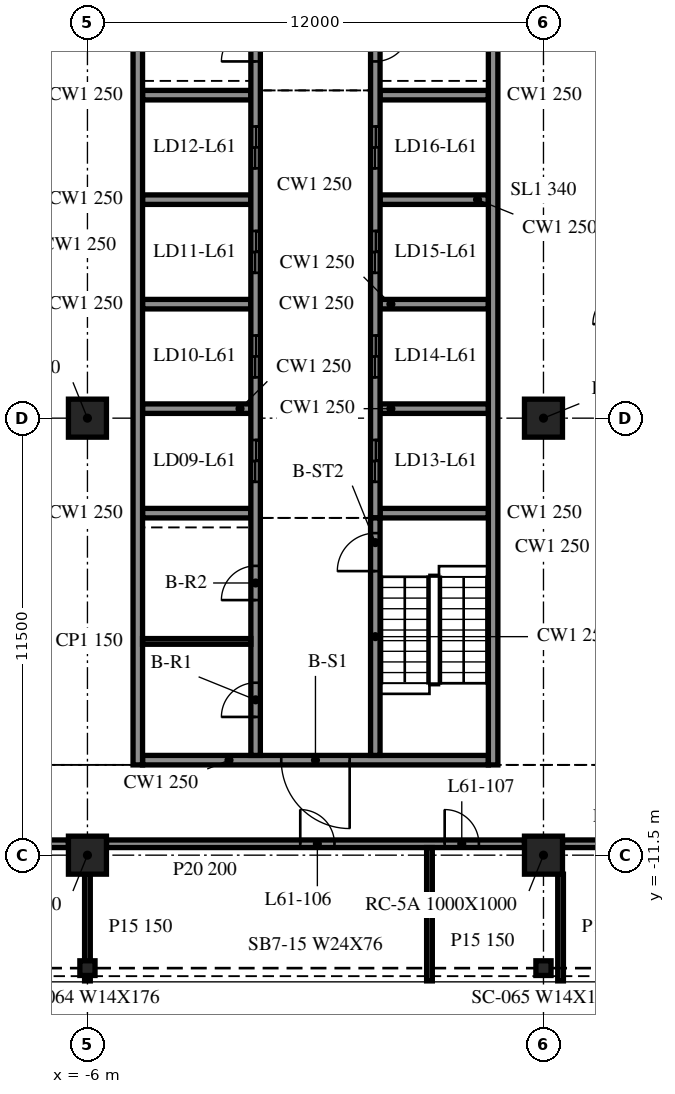
"""IFC4 building model, lengths in metres.
Left out: names, types, materials, properties, quantities, classifications, styles, units other than length and angle.
Written with IfcOpenShell. Run it as: python <this file> out.ifc"""

import sys

from ifc_helpers import new_model, si_unit, direction, frame, frame_2d, origin, origin_2d, place, context, subcontext, project, spatial, rectangle, i_section, extrude, element, fill, save


model = new_model("IFC4")
c1 = context("Model", 3, precision=1e-05, world=origin(), true_north=direction((0.0, 1.0)))
c2 = subcontext(c1, "Body", "Model", "MODEL_VIEW")
j1 = project(units=[si_unit("LENGTHUNIT", "METRE"), si_unit("PLANEANGLEUNIT", "RADIAN")], contexts=[c1])
p1 = place(None, origin())
s1 = spatial("IfcSite", under=j1, at=p1, CompositionType="ELEMENT")
p2 = place(p1, origin())
s2 = spatial("IfcBuilding", under=s1, at=p2, CompositionType="ELEMENT")
p3 = place(p2, frame((0.0, 0.0, 251.4)))
s3 = spatial("IfcBuildingStorey", under=s2, at=p3, CompositionType="ELEMENT", Elevation=251.4)
for number, where, z_axis, x_axis in (
    (1, (-6.0, -11.5, -0.34), (0.0, 0.0, 1.0), (1.0, 0.0, 0.0)),
    (2, (-6.0, 0.0, -0.34), (0.0, 0.0, 1.0), (1.0, 0.0, 0.0)),
    (3, (6.0, -11.5, -0.34), (0.0, 0.0, 1.0), (1.0, 0.0, 0.0)),
    (4, (6.0, 0.0, -0.34), (0.0, 0.0, 1.0), (1.0, 0.0, 0.0)),
):
    element("IfcColumn", number, at=place(p3, frame(where, z_axis=z_axis, x_axis=x_axis)), inside=s3, PredefinedType="COLUMN", context=c2, shape_type="SweptSolid", body=[
        extrude(rectangle(XDim=1.0, YDim=1.0, at=origin_2d()), origin(), (0.0, 0.0, 1.0), 3.8),
    ])
for number, where, z_axis, x_axis in (
    (5, (-6.0, -14.473, -0.34), (0.0, 0.0, 1.0), (1.0, 0.0, 0.0)),
    (6, (6.0, -14.473, -0.34), (0.0, 0.0, 1.0), (1.0, 0.0, 0.0)),
):
    element("IfcColumn", number, at=place(p3, frame(where, z_axis=z_axis, x_axis=x_axis)), inside=s3, PredefinedType="COLUMN", context=c2, shape_type="SweptSolid", body=[
        extrude(i_section(OverallWidth=0.399, OverallDepth=0.386, WebThickness=0.021, FlangeThickness=0.033, at=origin_2d()), origin(), (0.0, 0.0, 1.0), 3.8),
    ])
for number, where, z_axis, x_axis in (
    (7, (-4.675, 15.125, 0.0), (0.0, 0.0, 1.0), (0.0, -1.0, 0.0)),
    (8, (4.675, -9.125, 0.0), (0.0, 0.0, 1.0), (0.0, 1.0, 0.0)),
):
    element("IfcWall", number, at=place(p3, frame(where, z_axis=z_axis, x_axis=x_axis)), inside=s3, PredefinedType="SOLIDWALL", context=c2, shape_type="SweptSolid", body=[
        extrude(rectangle(XDim=24.25, YDim=0.25, at=frame_2d((12.125, 0.0))), origin(), (0.0, 0.0, 1.0), 3.46),
    ])
p4 = place(p3, frame((4.55, -9.0, 0.0), z_axis=(0.0, 0.0, 1.0), x_axis=(-1.0, 0.0, 0.0)))
e9 = element("IfcWall", 9, at=p4, inside=s3, PredefinedType="SOLIDWALL", context=c2, shape_type="SweptSolid", body=[
    extrude(rectangle(XDim=9.1, YDim=0.25, at=frame_2d((4.55, 0.0))), origin(), (0.0, 0.0, 1.0), 3.46),
])
p5 = place(p4, frame((3.65, 0.0, 0.0)))
e10 = element("IfcOpeningElement", 10, at=p5, cuts=e9, PredefinedType="OPENING", context=c2, shape_type="SweptSolid", body=[
    extrude(rectangle(XDim=1.8, YDim=2.1, at=frame_2d((0.9, 1.05))), frame((0.0, 0.135, 0.0), z_axis=(0.0, -1.0, 0.0), x_axis=(1.0, 0.0, 0.0)), (0.0, 0.0, 1.0), 0.27),
])
p6 = place(p3, frame((-1.575, -8.875, 0.0), z_axis=(0.0, 0.0, 1.0), x_axis=(0.0, 1.0, 0.0)))
e11 = element("IfcWall", 11, at=p6, inside=s3, PredefinedType="SOLIDWALL", context=c2, shape_type="SweptSolid", body=[
    extrude(rectangle(XDim=23.75, YDim=0.25, at=frame_2d((11.875, 0.0))), origin(), (0.0, 0.0, 1.0), 3.46),
])
p7 = place(p6, frame((7.2, 0.0, 0.0)))
e12 = element("IfcOpeningElement", 12, at=p7, cuts=e11, PredefinedType="OPENING", context=c2, shape_type="SweptSolid", body=[
    extrude(rectangle(XDim=1.1, YDim=2.1, at=frame_2d((0.55, 1.05))), frame((0.0, 0.135, 0.0), z_axis=(0.0, -1.0, 0.0), x_axis=(1.0, 0.0, 0.0)), (0.0, 0.0, 1.0), 0.27),
])
p8 = place(p6, frame((9.95, 0.0, 0.0)))
e13 = element("IfcOpeningElement", 13, at=p8, cuts=e11, PredefinedType="OPENING", context=c2, shape_type="SweptSolid", body=[
    extrude(rectangle(XDim=1.1, YDim=2.1, at=frame_2d((0.55, 1.05))), frame((0.0, 0.135, 0.0), z_axis=(0.0, -1.0, 0.0), x_axis=(1.0, 0.0, 0.0)), (0.0, 0.0, 1.0), 0.27),
])
p9 = place(p6, frame((12.7, 0.0, 0.0)))
e14 = element("IfcOpeningElement", 14, at=p9, cuts=e11, PredefinedType="OPENING", context=c2, shape_type="SweptSolid", body=[
    extrude(rectangle(XDim=1.1, YDim=2.1, at=frame_2d((0.55, 1.05))), frame((0.0, 0.135, 0.0), z_axis=(0.0, -1.0, 0.0), x_axis=(1.0, 0.0, 0.0)), (0.0, 0.0, 1.0), 0.27),
])
p10 = place(p6, frame((15.45, 0.0, 0.0)))
e15 = element("IfcOpeningElement", 15, at=p10, cuts=e11, PredefinedType="OPENING", context=c2, shape_type="SweptSolid", body=[
    extrude(rectangle(XDim=1.1, YDim=2.1, at=frame_2d((0.55, 1.05))), frame((0.0, 0.135, 0.0), z_axis=(0.0, -1.0, 0.0), x_axis=(1.0, 0.0, 0.0)), (0.0, 0.0, 1.0), 0.27),
])
p11 = place(p6, frame((1.012, 0.0, 0.0)))
e16 = element("IfcOpeningElement", 16, at=p11, cuts=e11, PredefinedType="OPENING", context=c2, shape_type="SweptSolid", body=[
    extrude(rectangle(XDim=0.9, YDim=2.1, at=frame_2d((0.45, 1.05))), frame((0.0, 0.135, 0.0), z_axis=(0.0, -1.0, 0.0), x_axis=(1.0, 0.0, 0.0)), (0.0, 0.0, 1.0), 0.27),
])
p12 = place(p6, frame((4.087, 0.0, 0.0)))
e17 = element("IfcOpeningElement", 17, at=p12, cuts=e11, PredefinedType="OPENING", context=c2, shape_type="SweptSolid", body=[
    extrude(rectangle(XDim=0.9, YDim=2.1, at=frame_2d((0.45, 1.05))), frame((0.0, 0.135, 0.0), z_axis=(0.0, -1.0, 0.0), x_axis=(1.0, 0.0, 0.0)), (0.0, 0.0, 1.0), 0.27),
])
p13 = place(p6, frame((18.262, 0.0, 0.0)))
e18 = element("IfcOpeningElement", 18, at=p13, cuts=e11, PredefinedType="OPENING", context=c2, shape_type="SweptSolid", body=[
    extrude(rectangle(XDim=0.9, YDim=2.1, at=frame_2d((0.45, 1.05))), frame((0.0, 0.135, 0.0), z_axis=(0.0, -1.0, 0.0), x_axis=(1.0, 0.0, 0.0)), (0.0, 0.0, 1.0), 0.27),
])
p14 = place(p6, frame((20.3, 0.0, 0.0)))
e19 = element("IfcOpeningElement", 19, at=p14, cuts=e11, PredefinedType="OPENING", context=c2, shape_type="SweptSolid", body=[
    extrude(rectangle(XDim=0.9, YDim=2.1, at=frame_2d((0.45, 1.05))), frame((0.0, 0.135, 0.0), z_axis=(0.0, -1.0, 0.0), x_axis=(1.0, 0.0, 0.0)), (0.0, 0.0, 1.0), 0.27),
])
p15 = place(p6, frame((22.337, 0.0, 0.0)))
e20 = element("IfcOpeningElement", 20, at=p15, cuts=e11, PredefinedType="OPENING", context=c2, shape_type="SweptSolid", body=[
    extrude(rectangle(XDim=0.9, YDim=2.1, at=frame_2d((0.45, 1.05))), frame((0.0, 0.135, 0.0), z_axis=(0.0, -1.0, 0.0), x_axis=(1.0, 0.0, 0.0)), (0.0, 0.0, 1.0), 0.27),
])
p16 = place(p3, frame((1.575, -8.875, 0.0), z_axis=(0.0, 0.0, 1.0), x_axis=(0.0, 1.0, 0.0)))
e21 = element("IfcWall", 21, at=p16, inside=s3, PredefinedType="SOLIDWALL", context=c2, shape_type="SweptSolid", body=[
    extrude(rectangle(XDim=6.25, YDim=0.25, at=frame_2d((3.125, 0.0))), origin(), (0.0, 0.0, 1.0), 3.46),
])
p17 = place(p16, frame((4.85, 0.0, 0.0)))
e22 = element("IfcOpeningElement", 22, at=p17, cuts=e21, PredefinedType="OPENING", context=c2, shape_type="SweptSolid", body=[
    extrude(rectangle(XDim=1.0, YDim=2.1, at=frame_2d((0.5, 1.05))), frame((0.0, 0.135, 0.0), z_axis=(0.0, -1.0, 0.0), x_axis=(1.0, 0.0, 0.0)), (0.0, 0.0, 1.0), 0.27),
])
p18 = place(p3, frame((1.575, 14.875, 0.0), z_axis=(0.0, 0.0, 1.0), x_axis=(0.0, -1.0, 0.0)))
e23 = element("IfcWall", 23, at=p18, inside=s3, PredefinedType="SOLIDWALL", context=c2, shape_type="SweptSolid", body=[
    extrude(rectangle(XDim=17.5, YDim=0.25, at=frame_2d((8.75, 0.0))), origin(), (0.0, 0.0, 1.0), 3.46),
])
p19 = place(p18, frame((15.45, 0.0, 0.0)))
e24 = element("IfcOpeningElement", 24, at=p19, cuts=e23, PredefinedType="OPENING", context=c2, shape_type="SweptSolid", body=[
    extrude(rectangle(XDim=1.1, YDim=2.1, at=frame_2d((0.55, 1.05))), frame((0.0, 0.135, 0.0), z_axis=(0.0, -1.0, 0.0), x_axis=(1.0, 0.0, 0.0)), (0.0, 0.0, 1.0), 0.27),
])
p20 = place(p18, frame((12.7, 0.0, 0.0)))
e25 = element("IfcOpeningElement", 25, at=p20, cuts=e23, PredefinedType="OPENING", context=c2, shape_type="SweptSolid", body=[
    extrude(rectangle(XDim=1.1, YDim=2.1, at=frame_2d((0.55, 1.05))), frame((0.0, 0.135, 0.0), z_axis=(0.0, -1.0, 0.0), x_axis=(1.0, 0.0, 0.0)), (0.0, 0.0, 1.0), 0.27),
])
p21 = place(p18, frame((9.95, 0.0, 0.0)))
e26 = element("IfcOpeningElement", 26, at=p21, cuts=e23, PredefinedType="OPENING", context=c2, shape_type="SweptSolid", body=[
    extrude(rectangle(XDim=1.1, YDim=2.1, at=frame_2d((0.55, 1.05))), frame((0.0, 0.135, 0.0), z_axis=(0.0, -1.0, 0.0), x_axis=(1.0, 0.0, 0.0)), (0.0, 0.0, 1.0), 0.27),
])
p22 = place(p18, frame((7.2, 0.0, 0.0)))
e27 = element("IfcOpeningElement", 27, at=p22, cuts=e23, PredefinedType="OPENING", context=c2, shape_type="SweptSolid", body=[
    extrude(rectangle(XDim=1.1, YDim=2.1, at=frame_2d((0.55, 1.05))), frame((0.0, 0.135, 0.0), z_axis=(0.0, -1.0, 0.0), x_axis=(1.0, 0.0, 0.0)), (0.0, 0.0, 1.0), 0.27),
])
p23 = place(p18, frame((4.587, 0.0, 0.0)))
e28 = element("IfcOpeningElement", 28, at=p23, cuts=e23, PredefinedType="OPENING", context=c2, shape_type="SweptSolid", body=[
    extrude(rectangle(XDim=0.9, YDim=2.1, at=frame_2d((0.45, 1.05))), frame((0.0, 0.135, 0.0), z_axis=(0.0, -1.0, 0.0), x_axis=(1.0, 0.0, 0.0)), (0.0, 0.0, 1.0), 0.27),
])
p24 = place(p18, frame((2.55, 0.0, 0.0)))
e29 = element("IfcOpeningElement", 29, at=p24, cuts=e23, PredefinedType="OPENING", context=c2, shape_type="SweptSolid", body=[
    extrude(rectangle(XDim=0.9, YDim=2.1, at=frame_2d((0.45, 1.05))), frame((0.0, 0.135, 0.0), z_axis=(0.0, -1.0, 0.0), x_axis=(1.0, 0.0, 0.0)), (0.0, 0.0, 1.0), 0.27),
])
p25 = place(p18, frame((0.512, 0.0, 0.0)))
e30 = element("IfcOpeningElement", 30, at=p25, cuts=e23, PredefinedType="OPENING", context=c2, shape_type="SweptSolid", body=[
    extrude(rectangle(XDim=0.9, YDim=2.1, at=frame_2d((0.45, 1.05))), frame((0.0, 0.135, 0.0), z_axis=(0.0, -1.0, 0.0), x_axis=(1.0, 0.0, 0.0)), (0.0, 0.0, 1.0), 0.27),
])
for number, where, z_axis, x_axis in (
    (31, (-4.55, -2.5, 0.0), (0.0, 0.0, 1.0), (1.0, 0.0, 0.0)),
    (32, (-4.55, 0.25, 0.0), (0.0, 0.0, 1.0), (1.0, 0.0, 0.0)),
    (33, (-4.55, 3.0, 0.0), (0.0, 0.0, 1.0), (1.0, 0.0, 0.0)),
    (34, (-4.55, 5.75, 0.0), (0.0, 0.0, 1.0), (1.0, 0.0, 0.0)),
    (35, (-4.55, 8.5, 0.0), (0.0, 0.0, 1.0), (1.0, 0.0, 0.0)),
    (36, (1.7, -2.5, 0.0), (0.0, 0.0, 1.0), (1.0, 0.0, 0.0)),
    (37, (1.7, 0.25, 0.0), (0.0, 0.0, 1.0), (1.0, 0.0, 0.0)),
    (38, (1.7, 3.0, 0.0), (0.0, 0.0, 1.0), (1.0, 0.0, 0.0)),
    (39, (1.7, 5.75, 0.0), (0.0, 0.0, 1.0), (1.0, 0.0, 0.0)),
    (40, (1.7, 8.5, 0.0), (0.0, 0.0, 1.0), (1.0, 0.0, 0.0)),
):
    element("IfcWall", number, at=place(p3, frame(where, z_axis=z_axis, x_axis=x_axis)), inside=s3, PredefinedType="SOLIDWALL", context=c2, shape_type="SweptSolid", body=[
        extrude(rectangle(XDim=2.85, YDim=0.25, at=frame_2d((1.425, 0.0))), origin(), (0.0, 0.0, 1.0), 3.46),
    ])
p26 = place(p3, frame((-4.55, -5.875, 0.0), z_axis=(0.0, 0.0, 1.0), x_axis=(1.0, 0.0, 0.0)))
e41 = element("IfcWall", 41, at=p26, inside=s3, PredefinedType="PARTITIONING", context=c2, shape_type="SweptSolid", body=[
    extrude(rectangle(XDim=2.85, YDim=0.15, at=frame_2d((1.425, 0.0))), origin(), (0.0, 0.0, 1.0), 3.46),
])
p27 = place(p3, frame((-17.5, -11.2, 0.0), z_axis=(0.0, 0.0, 1.0), x_axis=(1.0, 0.0, 0.0)))
e42 = element("IfcWall", 42, at=p27, inside=s3, PredefinedType="PARTITIONING", context=c2, shape_type="SweptSolid", body=[
    extrude(rectangle(XDim=11.0, YDim=0.2, at=frame_2d((5.5, 0.0))), origin(), (0.0, 0.0, 1.0), 3.46),
])
p28 = place(p27, frame((4.3, 0.0, 0.0)))
e43 = element("IfcOpeningElement", 43, at=p28, cuts=e42, PredefinedType="OPENING", context=c2, shape_type="SweptSolid", body=[
    extrude(rectangle(XDim=0.9, YDim=2.1, at=frame_2d((0.45, 1.05))), frame((0.0, 0.11, 0.0), z_axis=(0.0, -1.0, 0.0), x_axis=(1.0, 0.0, 0.0)), (0.0, 0.0, 1.0), 0.22),
])
p29 = place(p27, frame((5.9, 0.0, 0.0)))
e44 = element("IfcOpeningElement", 44, at=p29, cuts=e42, PredefinedType="OPENING", context=c2, shape_type="SweptSolid", body=[
    extrude(rectangle(XDim=0.9, YDim=2.1, at=frame_2d((0.45, 1.05))), frame((0.0, 0.11, 0.0), z_axis=(0.0, -1.0, 0.0), x_axis=(1.0, 0.0, 0.0)), (0.0, 0.0, 1.0), 0.22),
])
p30 = place(p3, frame((-5.5, -11.2, 0.0), z_axis=(0.0, 0.0, 1.0), x_axis=(1.0, 0.0, 0.0)))
e45 = element("IfcWall", 45, at=p30, inside=s3, PredefinedType="PARTITIONING", context=c2, shape_type="SweptSolid", body=[
    extrude(rectangle(XDim=11.0, YDim=0.2, at=frame_2d((5.5, 0.0))), origin(), (0.0, 0.0, 1.0), 3.46),
])
p31 = place(p30, frame((5.1, 0.0, 0.0)))
e46 = element("IfcOpeningElement", 46, at=p31, cuts=e45, PredefinedType="OPENING", context=c2, shape_type="SweptSolid", body=[
    extrude(rectangle(XDim=0.9, YDim=2.1, at=frame_2d((0.45, 1.05))), frame((0.0, 0.11, 0.0), z_axis=(0.0, -1.0, 0.0), x_axis=(1.0, 0.0, 0.0)), (0.0, 0.0, 1.0), 0.22),
])
p32 = place(p30, frame((8.9, 0.0, 0.0)))
e47 = element("IfcOpeningElement", 47, at=p32, cuts=e45, PredefinedType="OPENING", context=c2, shape_type="SweptSolid", body=[
    extrude(rectangle(XDim=0.9, YDim=2.1, at=frame_2d((0.45, 1.05))), frame((0.0, 0.11, 0.0), z_axis=(0.0, -1.0, 0.0), x_axis=(1.0, 0.0, 0.0)), (0.0, 0.0, 1.0), 0.22),
])
p33 = place(p3, frame((6.5, -11.2, 0.0), z_axis=(0.0, 0.0, 1.0), x_axis=(1.0, 0.0, 0.0)))
e48 = element("IfcWall", 48, at=p33, inside=s3, PredefinedType="PARTITIONING", context=c2, shape_type="SweptSolid", body=[
    extrude(rectangle(XDim=11.0, YDim=0.2, at=frame_2d((5.5, 0.0))), origin(), (0.0, 0.0, 1.0), 3.46),
])
p34 = place(p33, frame((4.3, 0.0, 0.0)))
e49 = element("IfcOpeningElement", 49, at=p34, cuts=e48, PredefinedType="OPENING", context=c2, shape_type="SweptSolid", body=[
    extrude(rectangle(XDim=0.9, YDim=2.1, at=frame_2d((0.45, 1.05))), frame((0.0, 0.11, 0.0), z_axis=(0.0, -1.0, 0.0), x_axis=(1.0, 0.0, 0.0)), (0.0, 0.0, 1.0), 0.22),
])
p35 = place(p33, frame((5.9, 0.0, 0.0)))
e50 = element("IfcOpeningElement", 50, at=p35, cuts=e48, PredefinedType="OPENING", context=c2, shape_type="SweptSolid", body=[
    extrude(rectangle(XDim=0.9, YDim=2.1, at=frame_2d((0.45, 1.05))), frame((0.0, 0.11, 0.0), z_axis=(0.0, -1.0, 0.0), x_axis=(1.0, 0.0, 0.0)), (0.0, 0.0, 1.0), 0.22),
])
p36 = place(p3, frame((-6.0, -14.809, 0.0), z_axis=(0.0, 0.0, 1.0), x_axis=(0.0, 1.0, 0.0)))
e51 = element("IfcWall", 51, at=p36, inside=s3, PredefinedType="PARTITIONING", context=c2, shape_type="SweptSolid", body=[
    extrude(rectangle(XDim=2.809, YDim=0.15, at=frame_2d((1.405, 0.0))), origin(), (0.0, 0.0, 1.0), 3.46),
])
p37 = place(p3, frame((3.0, -14.809, 0.0), z_axis=(0.0, 0.0, 1.0), x_axis=(0.0, 1.0, 0.0)))
e52 = element("IfcWall", 52, at=p37, inside=s3, PredefinedType="PARTITIONING", context=c2, shape_type="SweptSolid", body=[
    extrude(rectangle(XDim=3.509, YDim=0.15, at=frame_2d((1.754, 0.0))), origin(), (0.0, 0.0, 1.0), 3.46),
])
p38 = place(p3, frame((6.45, -14.809, 0.0), z_axis=(0.0, 0.0, 1.0), x_axis=(0.0, 1.0, 0.0)))
e53 = element("IfcWall", 53, at=p38, inside=s3, PredefinedType="PARTITIONING", context=c2, shape_type="SweptSolid", body=[
    extrude(rectangle(XDim=2.809, YDim=0.15, at=frame_2d((1.405, 0.0))), origin(), (0.0, 0.0, 1.0), 3.46),
])
p39 = place(p5, origin())
e54 = element("IfcDoor", 54, at=p39, inside=s3, OperationType="DOUBLE_DOOR_SINGLE_SWING", PredefinedType="DOOR", context=c2, shape_type="SweptSolid", body=[
    extrude(rectangle(XDim=1.8, YDim=2.1, at=frame_2d((0.9, 1.05))), frame((0.0, 0.025, 0.0), z_axis=(0.0, -1.0, 0.0), x_axis=(1.0, 0.0, 0.0)), (0.0, 0.0, 1.0), 0.05),
])
fill(e10, e54)
p40 = place(p19, origin())
e55 = element("IfcDoor", 55, at=p40, inside=s3, OperationType="DOUBLE_DOOR_SLIDING", PredefinedType="DOOR", context=c2, shape_type="SweptSolid", body=[
    extrude(rectangle(XDim=1.1, YDim=2.1, at=frame_2d((0.55, 1.05))), frame((0.0, 0.025, 0.0), z_axis=(0.0, -1.0, 0.0), x_axis=(1.0, 0.0, 0.0)), (0.0, 0.0, 1.0), 0.05),
])
fill(e24, e55)
p41 = place(p20, origin())
e56 = element("IfcDoor", 56, at=p41, inside=s3, OperationType="DOUBLE_DOOR_SLIDING", PredefinedType="DOOR", context=c2, shape_type="SweptSolid", body=[
    extrude(rectangle(XDim=1.1, YDim=2.1, at=frame_2d((0.55, 1.05))), frame((0.0, 0.025, 0.0), z_axis=(0.0, -1.0, 0.0), x_axis=(1.0, 0.0, 0.0)), (0.0, 0.0, 1.0), 0.05),
])
fill(e25, e56)
p42 = place(p21, origin())
e57 = element("IfcDoor", 57, at=p42, inside=s3, OperationType="DOUBLE_DOOR_SLIDING", PredefinedType="DOOR", context=c2, shape_type="SweptSolid", body=[
    extrude(rectangle(XDim=1.1, YDim=2.1, at=frame_2d((0.55, 1.05))), frame((0.0, 0.025, 0.0), z_axis=(0.0, -1.0, 0.0), x_axis=(1.0, 0.0, 0.0)), (0.0, 0.0, 1.0), 0.05),
])
fill(e26, e57)
p43 = place(p22, origin())
e58 = element("IfcDoor", 58, at=p43, inside=s3, OperationType="DOUBLE_DOOR_SLIDING", PredefinedType="DOOR", context=c2, shape_type="SweptSolid", body=[
    extrude(rectangle(XDim=1.1, YDim=2.1, at=frame_2d((0.55, 1.05))), frame((0.0, 0.025, 0.0), z_axis=(0.0, -1.0, 0.0), x_axis=(1.0, 0.0, 0.0)), (0.0, 0.0, 1.0), 0.05),
])
fill(e27, e58)
p44 = place(p7, origin())
e59 = element("IfcDoor", 59, at=p44, inside=s3, OperationType="DOUBLE_DOOR_SLIDING", PredefinedType="DOOR", context=c2, shape_type="SweptSolid", body=[
    extrude(rectangle(XDim=1.1, YDim=2.1, at=frame_2d((0.55, 1.05))), frame((0.0, 0.025, 0.0), z_axis=(0.0, -1.0, 0.0), x_axis=(1.0, 0.0, 0.0)), (0.0, 0.0, 1.0), 0.05),
])
fill(e12, e59)
p45 = place(p8, origin())
e60 = element("IfcDoor", 60, at=p45, inside=s3, OperationType="DOUBLE_DOOR_SLIDING", PredefinedType="DOOR", context=c2, shape_type="SweptSolid", body=[
    extrude(rectangle(XDim=1.1, YDim=2.1, at=frame_2d((0.55, 1.05))), frame((0.0, 0.025, 0.0), z_axis=(0.0, -1.0, 0.0), x_axis=(1.0, 0.0, 0.0)), (0.0, 0.0, 1.0), 0.05),
])
fill(e13, e60)
p46 = place(p9, origin())
e61 = element("IfcDoor", 61, at=p46, inside=s3, OperationType="DOUBLE_DOOR_SLIDING", PredefinedType="DOOR", context=c2, shape_type="SweptSolid", body=[
    extrude(rectangle(XDim=1.1, YDim=2.1, at=frame_2d((0.55, 1.05))), frame((0.0, 0.025, 0.0), z_axis=(0.0, -1.0, 0.0), x_axis=(1.0, 0.0, 0.0)), (0.0, 0.0, 1.0), 0.05),
])
fill(e14, e61)
p47 = place(p10, origin())
e62 = element("IfcDoor", 62, at=p47, inside=s3, OperationType="DOUBLE_DOOR_SLIDING", PredefinedType="DOOR", context=c2, shape_type="SweptSolid", body=[
    extrude(rectangle(XDim=1.1, YDim=2.1, at=frame_2d((0.55, 1.05))), frame((0.0, 0.025, 0.0), z_axis=(0.0, -1.0, 0.0), x_axis=(1.0, 0.0, 0.0)), (0.0, 0.0, 1.0), 0.05),
])
fill(e15, e62)
p48 = place(p11, origin())
e63 = element("IfcDoor", 63, at=p48, inside=s3, OperationType="SINGLE_SWING_LEFT", PredefinedType="DOOR", context=c2, shape_type="SweptSolid", body=[
    extrude(rectangle(XDim=0.9, YDim=2.1, at=frame_2d((0.45, 1.05))), frame((0.0, 0.025, 0.0), z_axis=(0.0, -1.0, 0.0), x_axis=(1.0, 0.0, 0.0)), (0.0, 0.0, 1.0), 0.05),
])
fill(e16, e63)
p49 = place(p12, origin())
e64 = element("IfcDoor", 64, at=p49, inside=s3, OperationType="SINGLE_SWING_RIGHT", PredefinedType="DOOR", context=c2, shape_type="SweptSolid", body=[
    extrude(rectangle(XDim=0.9, YDim=2.1, at=frame_2d((0.45, 1.05))), frame((0.0, 0.025, 0.0), z_axis=(0.0, -1.0, 0.0), x_axis=(1.0, 0.0, 0.0)), (0.0, 0.0, 1.0), 0.05),
])
fill(e17, e64)
p50 = place(p13, origin())
e65 = element("IfcDoor", 65, at=p50, inside=s3, OperationType="SINGLE_SWING_LEFT", PredefinedType="DOOR", context=c2, shape_type="SweptSolid", body=[
    extrude(rectangle(XDim=0.9, YDim=2.1, at=frame_2d((0.45, 1.05))), frame((0.0, 0.025, 0.0), z_axis=(0.0, -1.0, 0.0), x_axis=(1.0, 0.0, 0.0)), (0.0, 0.0, 1.0), 0.05),
])
fill(e18, e65)
p51 = place(p23, origin())
e66 = element("IfcDoor", 66, at=p51, inside=s3, OperationType="SINGLE_SWING_RIGHT", PredefinedType="DOOR", context=c2, shape_type="SweptSolid", body=[
    extrude(rectangle(XDim=0.9, YDim=2.1, at=frame_2d((0.45, 1.05))), frame((0.0, 0.025, 0.0), z_axis=(0.0, -1.0, 0.0), x_axis=(1.0, 0.0, 0.0)), (0.0, 0.0, 1.0), 0.05),
])
fill(e28, e66)
p52 = place(p17, origin())
e67 = element("IfcDoor", 67, at=p52, inside=s3, OperationType="SINGLE_SWING_LEFT", PredefinedType="DOOR", context=c2, shape_type="SweptSolid", body=[
    extrude(rectangle(XDim=1.0, YDim=2.1, at=frame_2d((0.5, 1.05))), frame((0.0, 0.025, 0.0), z_axis=(0.0, -1.0, 0.0), x_axis=(1.0, 0.0, 0.0)), (0.0, 0.0, 1.0), 0.05),
])
fill(e22, e67)
p53 = place(p31, origin())
e68 = element("IfcDoor", 68, at=p53, inside=s3, OperationType="SINGLE_SWING_LEFT", PredefinedType="DOOR", context=c2, shape_type="SweptSolid", body=[
    extrude(rectangle(XDim=0.9, YDim=2.1, at=frame_2d((0.45, 1.05))), frame((0.0, 0.025, 0.0), z_axis=(0.0, -1.0, 0.0), x_axis=(1.0, 0.0, 0.0)), (0.0, 0.0, 1.0), 0.05),
])
fill(e46, e68)
p54 = place(p32, origin())
e69 = element("IfcDoor", 69, at=p54, inside=s3, OperationType="SINGLE_SWING_LEFT", PredefinedType="DOOR", context=c2, shape_type="SweptSolid", body=[
    extrude(rectangle(XDim=0.9, YDim=2.1, at=frame_2d((0.45, 1.05))), frame((0.0, 0.025, 0.0), z_axis=(0.0, -1.0, 0.0), x_axis=(1.0, 0.0, 0.0)), (0.0, 0.0, 1.0), 0.05),
])
fill(e47, e69)
save(model, sys.argv[1])
